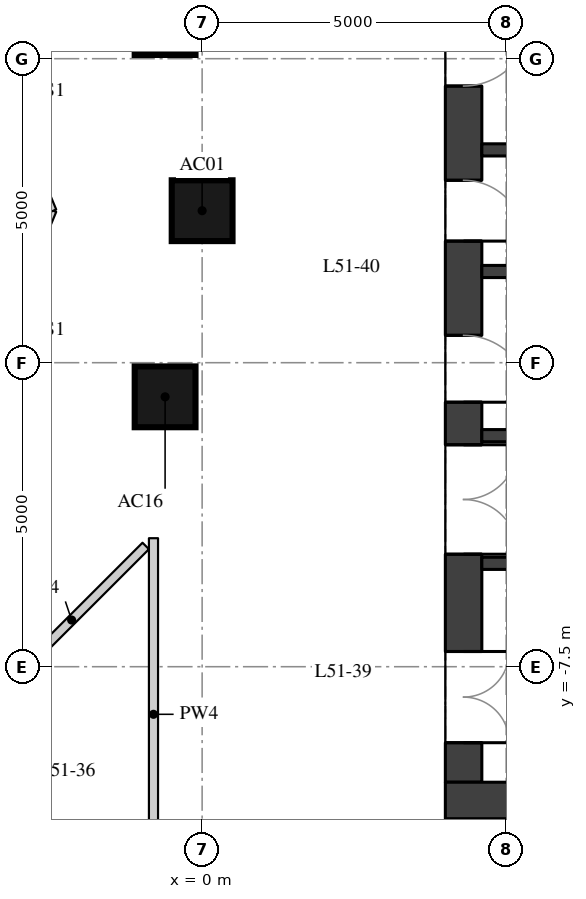
"""IFC4 building model, lengths in metres.
Left out: names, types, materials, properties, quantities, classifications, styles, units other than length and angle.
Written with IfcOpenShell. Run it as: python <this file> out.ifc"""

import sys

from ifc_helpers import new_model, si_unit, direction, frame, frame_2d, origin, origin_2d, place, context, subcontext, project, spatial, rectangle, extrude, element, fill, save


model = new_model("IFC4")
c1 = context("Model", 3, precision=1e-05, world=origin(), true_north=direction((0.0, 1.0)))
c2 = subcontext(c1, "Body", "Model", "MODEL_VIEW")
j1 = project(units=[si_unit("LENGTHUNIT", "METRE"), si_unit("PLANEANGLEUNIT", "RADIAN")], contexts=[c1])
p1 = place(None, origin())
s1 = spatial("IfcSite", under=j1, at=p1, CompositionType="ELEMENT")
p2 = place(p1, origin())
s2 = spatial("IfcBuilding", under=s1, at=p2, CompositionType="ELEMENT")
p3 = place(p2, frame((0.0, 0.0, 181.4)))
s3 = spatial("IfcBuildingStorey", under=s2, at=p3, CompositionType="ELEMENT", Elevation=181.4)
for number, where, z_axis, x_axis in (
    (1, (0.0, 0.0, 0.0), (0.0, 0.0, 1.0), (1.0, 0.0, 0.0)),
    (2, (-0.609, 3.062, 0.0), (0.0, 0.0, 1.0), (1.0, 0.0, 0.0)),
    (3, (-0.609, -3.062, 0.0), (0.0, 0.0, 1.0), (1.0, 0.0, 0.0)),
):
    element("IfcColumn", number, at=place(p3, frame(where, z_axis=z_axis, x_axis=x_axis)), inside=s3, PredefinedType="COLUMN", context=c2, shape_type="SweptSolid", body=[
        extrude(rectangle(XDim=1.0, YDim=1.0, at=origin_2d()), origin(), (0.0, 0.0, 1.0), 3.3),
    ])
p4 = place(p3, frame((4.3, -9.4, 0.0), z_axis=(0.0, 0.0, 1.0), x_axis=(0.0, 1.0, 0.0)))
e4 = element("IfcWall", 4, at=p4, inside=s3, PredefinedType="SHEAR", context=c2, shape_type="SweptSolid", body=[
    extrude(rectangle(XDim=18.8, YDim=0.6, at=frame_2d((9.4, 0.0))), origin(), (0.0, 0.0, 1.0), 2.85),
])
p5 = place(p4, frame((0.65, 0.0, 0.0)))
e5 = element("IfcOpeningElement", 5, at=p5, cuts=e4, PredefinedType="OPENING", context=c2, shape_type="SweptSolid", body=[
    extrude(rectangle(XDim=1.5, YDim=2.1, at=frame_2d((0.75, 1.05))), frame((0.0, 0.31, 0.0), z_axis=(0.0, -1.0, 0.0), x_axis=(1.0, 0.0, 0.0)), (0.0, 0.0, 1.0), 0.62),
])
p6 = place(p4, frame((3.75, 0.0, 0.0)))
e6 = element("IfcOpeningElement", 6, at=p6, cuts=e4, PredefinedType="OPENING", context=c2, shape_type="SweptSolid", body=[
    extrude(rectangle(XDim=1.8, YDim=2.1, at=frame_2d((0.9, 1.05))), frame((0.0, 0.31, 0.0), z_axis=(0.0, -1.0, 0.0), x_axis=(1.0, 0.0, 0.0)), (0.0, 0.0, 1.0), 0.62),
])
p7 = place(p4, frame((6.25, 0.0, 0.0)))
e7 = element("IfcOpeningElement", 7, at=p7, cuts=e4, PredefinedType="OPENING", context=c2, shape_type="SweptSolid", body=[
    extrude(rectangle(XDim=1.1, YDim=2.1, at=frame_2d((0.55, 1.05))), frame((0.0, 0.31, 0.0), z_axis=(0.0, -1.0, 0.0), x_axis=(1.0, 0.0, 0.0)), (0.0, 0.0, 1.0), 0.62),
])
p8 = place(p4, frame((8.9, 0.0, 0.0)))
e8 = element("IfcOpeningElement", 8, at=p8, cuts=e4, PredefinedType="OPENING", context=c2, shape_type="SweptSolid", body=[
    extrude(rectangle(XDim=1.0, YDim=2.1, at=frame_2d((0.5, 1.05))), frame((0.0, 0.31, 0.0), z_axis=(0.0, -1.0, 0.0), x_axis=(1.0, 0.0, 0.0)), (0.0, 0.0, 1.0), 0.62),
])
p9 = place(p4, frame((11.45, 0.0, 0.0)))
e9 = element("IfcOpeningElement", 9, at=p9, cuts=e4, PredefinedType="OPENING", context=c2, shape_type="SweptSolid", body=[
    extrude(rectangle(XDim=1.1, YDim=2.1, at=frame_2d((0.55, 1.05))), frame((0.0, 0.31, 0.0), z_axis=(0.0, -1.0, 0.0), x_axis=(1.0, 0.0, 0.0)), (0.0, 0.0, 1.0), 0.62),
])
p10 = place(p4, frame((13.25, 0.0, 0.0)))
e10 = element("IfcOpeningElement", 10, at=p10, cuts=e4, PredefinedType="OPENING", context=c2, shape_type="SweptSolid", body=[
    extrude(rectangle(XDim=1.8, YDim=2.1, at=frame_2d((0.9, 1.05))), frame((0.0, 0.31, 0.0), z_axis=(0.0, -1.0, 0.0), x_axis=(1.0, 0.0, 0.0)), (0.0, 0.0, 1.0), 0.62),
])
p11 = place(p4, frame((16.65, 0.0, 0.0)))
e11 = element("IfcOpeningElement", 11, at=p11, cuts=e4, PredefinedType="OPENING", context=c2, shape_type="SweptSolid", body=[
    extrude(rectangle(XDim=1.5, YDim=2.1, at=frame_2d((0.75, 1.05))), frame((0.0, 0.31, 0.0), z_axis=(0.0, -1.0, 0.0), x_axis=(1.0, 0.0, 0.0)), (0.0, 0.0, 1.0), 0.62),
])
p12 = place(p3, frame((4.0, -9.7, 0.0), z_axis=(0.0, 0.0, 1.0), x_axis=(1.0, 0.0, 0.0)))
e12 = element("IfcWall", 12, at=p12, inside=s3, PredefinedType="SHEAR", context=c2, shape_type="SweptSolid", body=[
    extrude(rectangle(XDim=12.0, YDim=0.6, at=frame_2d((6.0, 0.0))), origin(), (0.0, 0.0, 1.0), 2.85),
])
for number, where, z_axis, x_axis in (
    (13, (4.6, 1.0, 0.0), (0.0, 0.0, 1.0), (1.0, 0.0, 0.0)),
    (14, (4.6, -1.0, 0.0), (0.0, 0.0, 1.0), (1.0, 0.0, 0.0)),
):
    element("IfcWall", number, at=place(p3, frame(where, z_axis=z_axis, x_axis=x_axis)), inside=s3, PredefinedType="SHEAR", context=c2, shape_type="SweptSolid", body=[
        extrude(rectangle(XDim=10.8, YDim=0.2, at=frame_2d((5.4, 0.0))), origin(), (0.0, 0.0, 1.0), 2.85),
    ])
p13 = place(p3, frame((4.6, -3.7, 0.0), z_axis=(0.0, 0.0, 1.0), x_axis=(1.0, 0.0, 0.0)))
e15 = element("IfcWall", 15, at=p13, inside=s3, PredefinedType="SHEAR", context=c2, shape_type="SweptSolid", body=[
    extrude(rectangle(XDim=10.8, YDim=0.2, at=frame_2d((5.4, 0.0))), origin(), (0.0, 0.0, 1.0), 2.85),
])
p14 = place(p13, frame((6.6, 0.0, 0.0)))
e16 = element("IfcOpeningElement", 16, at=p14, cuts=e15, PredefinedType="OPENING", context=c2, shape_type="SweptSolid", body=[
    extrude(rectangle(XDim=1.1, YDim=2.1, at=frame_2d((0.55, 1.05))), frame((0.0, 0.11, 0.0), z_axis=(0.0, -1.0, 0.0), x_axis=(1.0, 0.0, 0.0)), (0.0, 0.0, 1.0), 0.22),
])
p15 = place(p13, frame((8.9, 0.0, 0.0)))
e17 = element("IfcOpeningElement", 17, at=p15, cuts=e15, PredefinedType="OPENING", context=c2, shape_type="SweptSolid", body=[
    extrude(rectangle(XDim=1.1, YDim=2.1, at=frame_2d((0.55, 1.05))), frame((0.0, 0.11, 0.0), z_axis=(0.0, -1.0, 0.0), x_axis=(1.0, 0.0, 0.0)), (0.0, 0.0, 1.0), 0.22),
])
p16 = place(p3, frame((4.6, -5.8, 0.0), z_axis=(0.0, 0.0, 1.0), x_axis=(1.0, 0.0, 0.0)))
e18 = element("IfcWall", 18, at=p16, inside=s3, PredefinedType="SHEAR", context=c2, shape_type="SweptSolid", body=[
    extrude(rectangle(XDim=10.8, YDim=0.2, at=frame_2d((5.4, 0.0))), origin(), (0.0, 0.0, 1.0), 2.85),
])
p17 = place(p3, frame((-0.8, -5.386, 0.0), z_axis=(0.0, 0.0, 1.0), x_axis=(0.0, -1.0, 0.0)))
e19 = element("IfcWall", 19, at=p17, inside=s3, PredefinedType="PARTITIONING", context=c2, shape_type="SweptSolid", body=[
    extrude(rectangle(XDim=5.793, YDim=0.15, at=frame_2d((2.896, 0.0))), origin(), (0.0, 0.0, 1.0), 2.85),
])
p18 = place(p3, frame((-2.148, -11.156, 0.0), z_axis=(0.0, 0.0, 1.0), x_axis=(-0.800210636755, 0.599719048241, 0.0)))
e20 = element("IfcWall", 20, at=p18, inside=s3, PredefinedType="PARTITIONING", context=c2, shape_type="SweptSolid", body=[
    extrude(rectangle(XDim=4.311, YDim=0.15, at=frame_2d((2.155, 0.0))), origin(), (0.0, 0.0, 1.0), 2.85),
])
p19 = place(p3, frame((-3.365, -7.951, 0.0), z_axis=(0.0, 0.0, 1.0), x_axis=(0.707106781187, 0.707106781187, 0.0)))
e21 = element("IfcWall", 21, at=p19, inside=s3, PredefinedType="PARTITIONING", context=c2, shape_type="SweptSolid", body=[
    extrude(rectangle(XDim=3.447, YDim=0.15, at=frame_2d((1.723, 0.0))), origin(), (0.0, 0.0, 1.0), 2.85),
])
for number, where, z_axis, x_axis in (
    (22, (-2.446, 0.0, 0.0), (0.0, 0.0, 1.0), (-0.383, -0.924, 0.0)),
    (23, (-4.073, 3.927, 0.0), (0.0, 0.0, 1.0), (0.383, -0.924, 0.0)),
):
    element("IfcWall", number, at=place(p3, frame(where, z_axis=z_axis, x_axis=x_axis)), inside=s3, PredefinedType="PARTITIONING", context=c2, shape_type="SweptSolid", body=[
        extrude(rectangle(XDim=4.251, YDim=0.1, at=frame_2d((2.125, 0.0))), origin(), (0.0, 0.0, 1.0), 2.85),
    ])
p20 = place(p5, origin())
e24 = element("IfcDoor", 24, at=p20, inside=s3, OperationType="DOUBLE_DOOR_SINGLE_SWING", PredefinedType="DOOR", context=c2, shape_type="SweptSolid", body=[
    extrude(rectangle(XDim=1.5, YDim=2.1, at=frame_2d((0.75, 1.05))), frame((0.0, 0.025, 0.0), z_axis=(0.0, -1.0, 0.0), x_axis=(1.0, 0.0, 0.0)), (0.0, 0.0, 1.0), 0.05),
])
fill(e5, e24)
p21 = place(p6, origin())
e25 = element("IfcDoor", 25, at=p21, inside=s3, OperationType="DOUBLE_DOOR_SINGLE_SWING", PredefinedType="DOOR", context=c2, shape_type="SweptSolid", body=[
    extrude(rectangle(XDim=1.8, YDim=2.1, at=frame_2d((0.9, 1.05))), frame((0.0, 0.025, 0.0), z_axis=(0.0, -1.0, 0.0), x_axis=(1.0, 0.0, 0.0)), (0.0, 0.0, 1.0), 0.05),
])
fill(e6, e25)
p22 = place(p7, origin())
e26 = element("IfcDoor", 26, at=p22, inside=s3, OperationType="SINGLE_SWING_RIGHT", PredefinedType="DOOR", context=c2, shape_type="SweptSolid", body=[
    extrude(rectangle(XDim=1.1, YDim=2.1, at=frame_2d((0.55, 1.05))), frame((0.0, 0.025, 0.0), z_axis=(0.0, -1.0, 0.0), x_axis=(1.0, 0.0, 0.0)), (0.0, 0.0, 1.0), 0.05),
])
fill(e7, e26)
p23 = place(p8, origin())
e27 = element("IfcDoor", 27, at=p23, inside=s3, OperationType="SINGLE_SWING_RIGHT", PredefinedType="DOOR", context=c2, shape_type="SweptSolid", body=[
    extrude(rectangle(XDim=1.0, YDim=2.1, at=frame_2d((0.5, 1.05))), frame((0.0, 0.025, 0.0), z_axis=(0.0, -1.0, 0.0), x_axis=(1.0, 0.0, 0.0)), (0.0, 0.0, 1.0), 0.05),
])
fill(e8, e27)
p24 = place(p9, origin())
e28 = element("IfcDoor", 28, at=p24, inside=s3, OperationType="SINGLE_SWING_LEFT", PredefinedType="DOOR", context=c2, shape_type="SweptSolid", body=[
    extrude(rectangle(XDim=1.1, YDim=2.1, at=frame_2d((0.55, 1.05))), frame((0.0, 0.025, 0.0), z_axis=(0.0, -1.0, 0.0), x_axis=(1.0, 0.0, 0.0)), (0.0, 0.0, 1.0), 0.05),
])
fill(e9, e28)
save(model, sys.argv[1])
